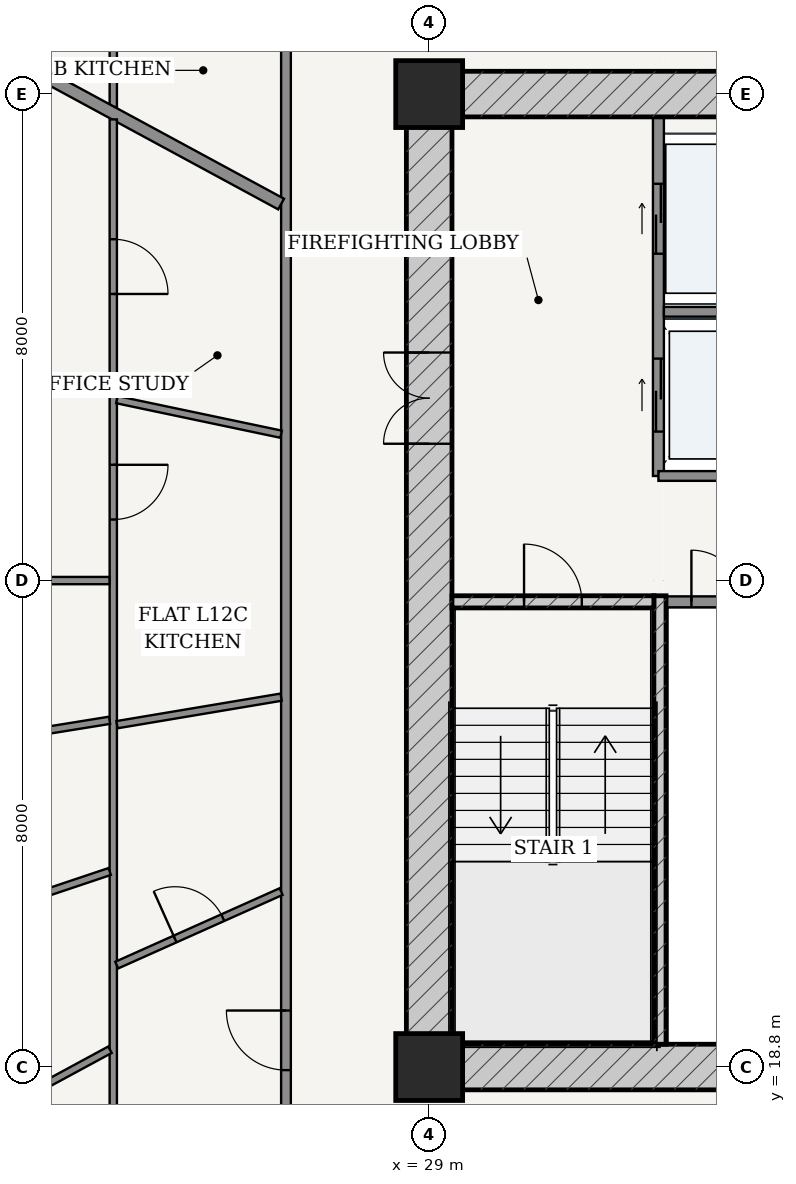
"""IFC4 building model, lengths in metres.
Left out: names, types, materials, properties, quantities, classifications, styles, units other than length and angle.
Written with IfcOpenShell. Run it as: python <this file> out.ifc"""

import sys

from ifc_helpers import new_model, si_unit, direction, frame, frame_2d, origin, origin_2d, place, context, subcontext, project, spatial, rectangle, extrude, source, transform, mapped, element, fill, save


model = new_model("IFC4")
c1 = context("Model", 3, precision=1e-05, world=origin(), true_north=direction((-0.2419218956, 0.970295726276)))
c2 = subcontext(c1, "Body", "Model", "MODEL_VIEW")
j1 = project(units=[si_unit("LENGTHUNIT", "METRE"), si_unit("PLANEANGLEUNIT", "RADIAN")], contexts=[c1])
p1 = place(None, origin())
s1 = spatial("IfcSite", under=j1, at=p1, CompositionType="ELEMENT")
p2 = place(p1, origin())
s2 = spatial("IfcBuilding", under=s1, at=p2, CompositionType="ELEMENT")
p3 = place(p2, frame((0.0, 0.0, 49.2)))
s3 = spatial("IfcBuildingStorey", under=s2, at=p3, CompositionType="ELEMENT", Elevation=49.2)
for number, where, z_axis, x_axis in (
    (1, (29.0, 18.8, 0.0), (0.0, 0.0, 1.0), (1.0, 0.0, 0.0)),
    (2, (29.0, 34.8, 0.0), (0.0, 0.0, 1.0), (1.0, 0.0, 0.0)),
):
    element("IfcColumn", number, at=place(p3, frame(where, z_axis=z_axis, x_axis=x_axis)), inside=s3, PredefinedType="COLUMN", context=c2, shape_type="SweptSolid", body=[
        extrude(rectangle(XDim=1.1, YDim=1.1, at=origin_2d()), origin(), (0.0, 0.0, 1.0), 3.6),
    ])
p4 = place(p3, frame((28.625, 18.8, 0.0), z_axis=(0.0, 0.0, 1.0), x_axis=(1.0, 0.0, 0.0)))
e3 = element("IfcWall", 3, at=p4, inside=s3, PredefinedType="SHEAR", context=c2, shape_type="SweptSolid", body=[
    extrude(rectangle(XDim=18.75, YDim=0.75, at=frame_2d((9.375, 0.0))), origin(), (0.0, 0.0, 1.0), 3.32),
])
p5 = place(p4, frame((7.627, 0.0, 0.0)))
e4 = element("IfcOpeningElement", 4, at=p5, cuts=e3, PredefinedType="OPENING", context=c2, shape_type="SweptSolid", body=[
    extrude(rectangle(XDim=0.85, YDim=2.1, at=frame_2d((0.425, 1.05))), frame((0.0, 0.385, 0.0), z_axis=(0.0, -1.0, 0.0), x_axis=(1.0, 0.0, 0.0)), (0.0, 0.0, 1.0), 0.77),
])
p6 = place(p4, frame((10.673, 0.0, 0.0)))
e5 = element("IfcOpeningElement", 5, at=p6, cuts=e3, PredefinedType="OPENING", context=c2, shape_type="SweptSolid", body=[
    extrude(rectangle(XDim=0.85, YDim=2.1, at=frame_2d((0.425, 1.05))), frame((0.0, 0.385, 0.0), z_axis=(0.0, -1.0, 0.0), x_axis=(1.0, 0.0, 0.0)), (0.0, 0.0, 1.0), 0.77),
])
p7 = place(p3, frame((28.625, 34.8, 0.0), z_axis=(0.0, 0.0, 1.0), x_axis=(1.0, 0.0, 0.0)))
e6 = element("IfcWall", 6, at=p7, inside=s3, PredefinedType="SHEAR", context=c2, shape_type="SweptSolid", body=[
    extrude(rectangle(XDim=18.75, YDim=0.75, at=frame_2d((9.375, 0.0))), origin(), (0.0, 0.0, 1.0), 3.32),
])
p8 = place(p7, frame((6.887, 0.0, 0.0)))
e7 = element("IfcOpeningElement", 7, at=p8, cuts=e6, PredefinedType="OPENING", context=c2, shape_type="SweptSolid", body=[
    extrude(rectangle(XDim=0.85, YDim=2.1, at=frame_2d((0.425, 1.05))), frame((0.0, 0.385, 0.0), z_axis=(0.0, -1.0, 0.0), x_axis=(1.0, 0.0, 0.0)), (0.0, 0.0, 1.0), 0.77),
])
p9 = place(p7, frame((8.945, 0.0, 0.0)))
e8 = element("IfcOpeningElement", 8, at=p9, cuts=e6, PredefinedType="OPENING", context=c2, shape_type="SweptSolid", body=[
    extrude(rectangle(XDim=0.86, YDim=2.1, at=frame_2d((0.43, 1.05))), frame((0.0, 0.385, 0.0), z_axis=(0.0, -1.0, 0.0), x_axis=(1.0, 0.0, 0.0)), (0.0, 0.0, 1.0), 0.77),
])
p10 = place(p7, frame((11.012, 0.0, 0.0)))
e9 = element("IfcOpeningElement", 9, at=p10, cuts=e6, PredefinedType="OPENING", context=c2, shape_type="SweptSolid", body=[
    extrude(rectangle(XDim=0.85, YDim=2.1, at=frame_2d((0.425, 1.05))), frame((0.0, 0.385, 0.0), z_axis=(0.0, -1.0, 0.0), x_axis=(1.0, 0.0, 0.0)), (0.0, 0.0, 1.0), 0.77),
])
p11 = place(p3, frame((29.0, 19.175, 0.0), z_axis=(0.0, 0.0, 1.0), x_axis=(0.0, 1.0, 0.0)))
e10 = element("IfcWall", 10, at=p11, inside=s3, PredefinedType="SHEAR", context=c2, shape_type="SweptSolid", body=[
    extrude(rectangle(XDim=15.25, YDim=0.75, at=frame_2d((7.625, 0.0))), origin(), (0.0, 0.0, 1.0), 3.32),
])
p12 = place(p11, frame((9.875, 0.0, 0.0)))
e11 = element("IfcOpeningElement", 11, at=p12, cuts=e10, PredefinedType="OPENING", context=c2, shape_type="SweptSolid", body=[
    extrude(rectangle(XDim=1.5, YDim=2.2, at=frame_2d((0.75, 1.1))), frame((0.0, 0.385, 0.0), z_axis=(0.0, -1.0, 0.0), x_axis=(1.0, 0.0, 0.0)), (0.0, 0.0, 1.0), 0.77),
])
p13 = place(p3, frame((32.795, 19.175, 0.0), z_axis=(0.0, 0.0, 1.0), x_axis=(0.0, 1.0, 0.0)))
e12 = element("IfcWall", 12, at=p13, inside=s3, PredefinedType="SOLIDWALL", context=c2, shape_type="SweptSolid", body=[
    extrude(rectangle(XDim=7.375, YDim=0.2, at=frame_2d((3.688, 0.0))), origin(), (0.0, 0.0, 1.0), 3.32),
])
p14 = place(p3, frame((29.375, 26.45, 0.0), z_axis=(0.0, 0.0, 1.0), x_axis=(1.0, 0.0, 0.0)))
e13 = element("IfcWall", 13, at=p14, inside=s3, PredefinedType="SOLIDWALL", context=c2, shape_type="SweptSolid", body=[
    extrude(rectangle(XDim=3.32, YDim=0.2, at=frame_2d((1.66, 0.0))), origin(), (0.0, 0.0, 1.0), 3.32),
])
p15 = place(p14, frame((1.185, 0.0, 0.0)))
e14 = element("IfcOpeningElement", 14, at=p15, cuts=e13, PredefinedType="OPENING", context=c2, shape_type="SweptSolid", body=[
    extrude(rectangle(XDim=0.95, YDim=2.15, at=frame_2d((0.475, 1.075))), frame((0.0, 0.11, 0.0), z_axis=(0.0, -1.0, 0.0), x_axis=(1.0, 0.0, 0.0)), (0.0, 0.0, 1.0), 0.22),
])
p16 = place(p3, frame((32.9, 26.45, 0.0), z_axis=(0.0, 0.0, 1.0), x_axis=(1.0, 0.0, 0.0)))
e15 = element("IfcWall", 15, at=p16, inside=s3, PredefinedType="PARTITIONING", context=c2, shape_type="SweptSolid", body=[
    extrude(rectangle(XDim=1.675, YDim=0.18, at=frame_2d((0.837, 0.0))), origin(), (0.0, 0.0, 1.0), 3.32),
])
p17 = place(p16, frame((0.413, 0.0, 0.0)))
e16 = element("IfcOpeningElement", 16, at=p17, cuts=e15, PredefinedType="OPENING", context=c2, shape_type="SweptSolid", body=[
    extrude(rectangle(XDim=0.85, YDim=2.1, at=frame_2d((0.425, 1.05))), frame((0.0, 0.1, 0.0), z_axis=(0.0, -1.0, 0.0), x_axis=(1.0, 0.0, 0.0)), (0.0, 0.0, 1.0), 0.2),
])
p18 = place(p3, frame((32.77, 28.52, 0.0), z_axis=(0.0, 0.0, 1.0), x_axis=(0.0, 1.0, 0.0)))
e17 = element("IfcWall", 17, at=p18, inside=s3, PredefinedType="PARTITIONING", context=c2, shape_type="SweptSolid", body=[
    extrude(rectangle(XDim=5.905, YDim=0.18, at=frame_2d((2.953, 0.0))), origin(), (0.0, 0.0, 1.0), 3.32),
])
p19 = place(p18, frame((3.655, 0.0, 0.0)))
e18 = element("IfcOpeningElement", 18, at=p19, cuts=e17, PredefinedType="OPENING", context=c2, shape_type="SweptSolid", body=[
    extrude(rectangle(XDim=1.15, YDim=2.2, at=frame_2d((0.575, 1.1))), frame((0.0, 0.1, 0.0), z_axis=(0.0, -1.0, 0.0), x_axis=(1.0, 0.0, 0.0)), (0.0, 0.0, 1.0), 0.2),
])
p20 = place(p18, frame((0.73, 0.0, 0.0)))
e19 = element("IfcOpeningElement", 19, at=p20, cuts=e17, PredefinedType="OPENING", context=c2, shape_type="SweptSolid", body=[
    extrude(rectangle(XDim=1.2, YDim=2.25, at=frame_2d((0.6, 1.125))), frame((0.0, 0.1, 0.0), z_axis=(0.0, -1.0, 0.0), x_axis=(1.0, 0.0, 0.0)), (0.0, 0.0, 1.0), 0.2),
])
p21 = place(p3, frame((32.86, 31.22, 0.0), z_axis=(0.0, 0.0, 1.0), x_axis=(1.0, 0.0, 0.0)))
e20 = element("IfcWall", 20, at=p21, inside=s3, PredefinedType="PARTITIONING", context=c2, shape_type="SweptSolid", body=[
    extrude(rectangle(XDim=1.715, YDim=0.16, at=frame_2d((0.857, 0.0))), origin(), (0.0, 0.0, 1.0), 3.32),
])
p22 = place(p3, frame((32.77, 28.52, 0.0), z_axis=(0.0, 0.0, 1.0), x_axis=(1.0, 0.0, 0.0)))
e21 = element("IfcWall", 21, at=p22, inside=s3, PredefinedType="PARTITIONING", context=c2, shape_type="SweptSolid", body=[
    extrude(rectangle(XDim=1.805, YDim=0.16, at=frame_2d((0.902, 0.0))), origin(), (0.0, 0.0, 1.0), 3.32),
])
p23 = place(p3, frame((26.645, 16.525, 0.0), z_axis=(0.0, 0.0, 1.0), x_axis=(0.0, 1.0, 0.0)))
e22 = element("IfcWall", 22, at=p23, inside=s3, PredefinedType="PARTITIONING", context=c2, shape_type="SweptSolid", body=[
    extrude(rectangle(XDim=20.55, YDim=0.16, at=frame_2d((10.275, 0.0))), origin(), (0.0, 0.0, 1.0), 2.688),
])
p24 = place(p23, frame((2.224, 0.0, 0.0)))
e23 = element("IfcOpeningElement", 23, at=p24, cuts=e22, PredefinedType="OPENING", context=c2, shape_type="SweptSolid", body=[
    extrude(rectangle(XDim=0.98, YDim=2.2, at=frame_2d((0.49, 1.1))), frame((0.0, 0.09, 0.0), z_axis=(0.0, -1.0, 0.0), x_axis=(1.0, 0.0, 0.0)), (0.0, 0.0, 1.0), 0.18),
])
p25 = place(p3, frame((23.805, 34.588, 0.0), z_axis=(0.0, 0.0, 1.0), x_axis=(0.0, 1.0, 0.0)))
e24 = element("IfcWall", 24, at=p25, inside=s3, PredefinedType="PARTITIONING", context=c2, shape_type="SweptSolid", body=[
    extrude(rectangle(XDim=5.407, YDim=0.12, at=frame_2d((2.704, 0.0))), origin(), (0.0, 0.0, 1.0), 2.999),
])
p26 = place(p25, frame((2.253, 0.0, 0.0)))
e25 = element("IfcOpeningElement", 25, at=p26, cuts=e24, PredefinedType="OPENING", context=c2, shape_type="SweptSolid", body=[
    extrude(rectangle(XDim=0.9, YDim=2.15, at=frame_2d((0.45, 1.075))), frame((0.0, 0.07, 0.0), z_axis=(0.0, -1.0, 0.0), x_axis=(1.0, 0.0, 0.0)), (0.0, 0.0, 1.0), 0.14),
])
p27 = place(p3, frame((26.565, 32.991, 0.0), z_axis=(0.0, 0.0, 1.0), x_axis=(-0.879369737803, 0.476139542819, 0.0)))
e26 = element("IfcWall", 26, at=p27, inside=s3, PredefinedType="PARTITIONING", context=c2, shape_type="SweptSolid", body=[
    extrude(rectangle(XDim=14.295, YDim=0.2, at=frame_2d((7.147, 0.0))), origin(), (0.0, 0.0, 1.0), 2.688),
])
p28 = place(p3, frame((23.805, 13.605, 0.0), z_axis=(0.0, 0.0, 1.0), x_axis=(0.0, 1.0, 0.0)))
e27 = element("IfcWall", 27, at=p28, inside=s3, PredefinedType="PARTITIONING", context=c2, shape_type="SweptSolid", body=[
    extrude(rectangle(XDim=20.779, YDim=0.12, at=frame_2d((10.39, 0.0))), origin(), (0.0, 0.0, 1.0), 2.688),
])
p29 = place(p28, frame((2.425, 0.0, 0.0)))
e28 = element("IfcOpeningElement", 28, at=p29, cuts=e27, PredefinedType="OPENING", context=c2, shape_type="SweptSolid", body=[
    extrude(rectangle(XDim=0.9, YDim=2.15, at=frame_2d((0.45, 1.075))), frame((0.0, 0.07, 0.0), z_axis=(0.0, -1.0, 0.0), x_axis=(1.0, 0.0, 0.0)), (0.0, 0.0, 1.0), 0.14),
])
p30 = place(p28, frame((14.199, 0.0, 0.0)))
e29 = element("IfcOpeningElement", 29, at=p30, cuts=e27, PredefinedType="OPENING", context=c2, shape_type="SweptSolid", body=[
    extrude(rectangle(XDim=0.9, YDim=2.15, at=frame_2d((0.45, 1.075))), frame((0.0, 0.07, 0.0), z_axis=(0.0, -1.0, 0.0), x_axis=(1.0, 0.0, 0.0)), (0.0, 0.0, 1.0), 0.14),
])
p31 = place(p28, frame((17.908, 0.0, 0.0)))
e30 = element("IfcOpeningElement", 30, at=p31, cuts=e27, PredefinedType="OPENING", context=c2, shape_type="SweptSolid", body=[
    extrude(rectangle(XDim=0.9, YDim=2.15, at=frame_2d((0.45, 1.075))), frame((0.0, 0.07, 0.0), z_axis=(0.0, -1.0, 0.0), x_axis=(1.0, 0.0, 0.0)), (0.0, 0.0, 1.0), 0.14),
])
p32 = place(p3, frame((23.743, 26.8, 0.0), z_axis=(0.0, 0.0, 1.0), x_axis=(-1.0, 0.0, 0.0)))
e31 = element("IfcWall", 31, at=p32, inside=s3, PredefinedType="PARTITIONING", context=c2, shape_type="SweptSolid", body=[
    extrude(rectangle(XDim=14.683, YDim=0.12, at=frame_2d((7.341, 0.0))), origin(), (0.0, 0.0, 1.0), 2.762),
])
p33 = place(p32, frame((6.892, 0.0, 0.0)))
e32 = element("IfcOpeningElement", 32, at=p33, cuts=e31, PredefinedType="OPENING", context=c2, shape_type="SweptSolid", body=[
    extrude(rectangle(XDim=0.9, YDim=2.15, at=frame_2d((0.45, 1.075))), frame((0.0, 0.07, 0.0), z_axis=(0.0, -1.0, 0.0), x_axis=(1.0, 0.0, 0.0)), (0.0, 0.0, 1.0), 0.14),
])
p34 = place(p3, frame((23.744, 24.502, 0.0), z_axis=(0.0, 0.0, 1.0), x_axis=(-0.987259708938, -0.159117149007, 0.0)))
e33 = element("IfcWall", 33, at=p34, inside=s3, PredefinedType="PARTITIONING", context=c2, shape_type="SweptSolid", body=[
    extrude(rectangle(XDim=14.248, YDim=0.12, at=frame_2d((7.124, 0.0))), origin(), (0.0, 0.0, 1.0), 2.688),
])
p35 = place(p34, frame((5.603, 0.0, 0.0)))
e34 = element("IfcOpeningElement", 34, at=p35, cuts=e33, PredefinedType="OPENING", context=c2, shape_type="SweptSolid", body=[
    extrude(rectangle(XDim=0.9, YDim=2.15, at=frame_2d((0.45, 1.075))), frame((0.0, 0.07, 0.0), z_axis=(0.0, -1.0, 0.0), x_axis=(1.0, 0.0, 0.0)), (0.0, 0.0, 1.0), 0.14),
])
p36 = place(p3, frame((23.746, 22.016, 0.0), z_axis=(0.0, 0.0, 1.0), x_axis=(-0.948022802246, -0.318202398516, 0.0)))
e35 = element("IfcWall", 35, at=p36, inside=s3, PredefinedType="PARTITIONING", context=c2, shape_type="SweptSolid", body=[
    extrude(rectangle(XDim=13.163, YDim=0.12, at=frame_2d((6.582, 0.0))), origin(), (0.0, 0.0, 1.0), 2.762),
])
p37 = place(p36, frame((6.131, 0.0, 0.0)))
e36 = element("IfcOpeningElement", 36, at=p37, cuts=e35, PredefinedType="OPENING", context=c2, shape_type="SweptSolid", body=[
    extrude(rectangle(XDim=0.9, YDim=2.15, at=frame_2d((0.45, 1.075))), frame((0.0, 0.07, 0.0), z_axis=(0.0, -1.0, 0.0), x_axis=(1.0, 0.0, 0.0)), (0.0, 0.0, 1.0), 0.14),
])
p38 = place(p3, frame((23.75, 19.084, 0.0), z_axis=(0.0, 0.0, 1.0), x_axis=(-0.879370672984, -0.476137815654, 0.0)))
e37 = element("IfcWall", 37, at=p38, inside=s3, PredefinedType="PARTITIONING", context=c2, shape_type="SweptSolid", body=[
    extrude(rectangle(XDim=11.094, YDim=0.12, at=frame_2d((5.547, 0.0))), origin(), (0.0, 0.0, 1.0), 2.688),
])
p39 = place(p38, frame((4.034, 0.0, 0.0)))
e38 = element("IfcOpeningElement", 38, at=p39, cuts=e37, PredefinedType="OPENING", context=c2, shape_type="SweptSolid", body=[
    extrude(rectangle(XDim=0.9, YDim=2.15, at=frame_2d((0.45, 1.075))), frame((0.0, 0.07, 0.0), z_axis=(0.0, -1.0, 0.0), x_axis=(1.0, 0.0, 0.0)), (0.0, 0.0, 1.0), 0.14),
])
p40 = place(p3, frame((26.565, 29.207, 0.0), z_axis=(0.0, 0.0, 1.0), x_axis=(-0.978560113768, 0.205961413236, 0.0)))
e39 = element("IfcWall", 39, at=p40, inside=s3, PredefinedType="PARTITIONING", context=c2, shape_type="SweptSolid", body=[
    extrude(rectangle(XDim=2.758, YDim=0.12, at=frame_2d((1.379, 0.0))), origin(), (0.0, 0.0, 1.0), 3.32),
])
p41 = place(p3, frame((26.565, 24.883, 0.0), z_axis=(0.0, 0.0, 1.0), x_axis=(-0.986224611599, -0.165411654596, 0.0)))
e40 = element("IfcWall", 40, at=p41, inside=s3, PredefinedType="PARTITIONING", context=c2, shape_type="SweptSolid", body=[
    extrude(rectangle(XDim=2.736, YDim=0.12, at=frame_2d((1.368, 0.0))), origin(), (0.0, 0.0, 1.0), 2.688),
])
p42 = place(p3, frame((26.565, 21.685, 0.0), z_axis=(0.0, 0.0, 1.0), x_axis=(-0.912840085104, -0.408317252914, 0.0)))
e41 = element("IfcWall", 41, at=p42, inside=s3, PredefinedType="PARTITIONING", context=c2, shape_type="SweptSolid", body=[
    extrude(rectangle(XDim=2.961, YDim=0.12, at=frame_2d((1.481, 0.0))), origin(), (0.0, 0.0, 1.0), 3.32),
])
p43 = place(p42, frame((1.051, 0.0, 0.0)))
e42 = element("IfcOpeningElement", 42, at=p43, cuts=e41, PredefinedType="OPENING", context=c2, shape_type="SweptSolid", body=[
    extrude(rectangle(XDim=0.86, YDim=2.15, at=frame_2d((0.43, 1.075))), frame((0.0, 0.07, 0.0), z_axis=(0.0, -1.0, 0.0), x_axis=(1.0, 0.0, 0.0)), (0.0, 0.0, 1.0), 0.14),
])
m1 = source(origin(), c2, "Body", "SweptSolid", [
    extrude(rectangle(XDim=1.5, YDim=2.2, at=frame_2d((0.75, 1.1))), frame((0.0, 0.025, 0.0), z_axis=(0.0, -1.0, 0.0), x_axis=(1.0, 0.0, 0.0)), (0.0, 0.0, 1.0), 0.05),
])
p44 = place(p12, origin())
e43 = element("IfcDoor", 43, at=p44, inside=s3, OperationType="DOUBLE_DOOR_SINGLE_SWING", PredefinedType="DOOR", context=c2, shape_type="MappedRepresentation", body=[
    mapped(m1, transform((0.0, 0.0, 0.0), scale=1.0)),
])
fill(e11, e43)
m2 = source(origin(), c2, "Body", "SweptSolid", [
    extrude(rectangle(XDim=0.95, YDim=2.15, at=frame_2d((0.475, 1.075))), frame((0.0, 0.025, 0.0), z_axis=(0.0, -1.0, 0.0), x_axis=(1.0, 0.0, 0.0)), (0.0, 0.0, 1.0), 0.05),
])
p45 = place(p15, origin())
e44 = element("IfcDoor", 44, at=p45, inside=s3, OperationType="SINGLE_SWING_LEFT", PredefinedType="DOOR", context=c2, shape_type="MappedRepresentation", body=[
    mapped(m2, transform((0.0, 0.0, 0.0), scale=1.0)),
])
fill(e14, e44)
m3 = source(origin(), c2, "Body", "SweptSolid", [
    extrude(rectangle(XDim=0.85, YDim=2.1, at=frame_2d((0.425, 1.05))), frame((0.0, 0.025, 0.0), z_axis=(0.0, -1.0, 0.0), x_axis=(1.0, 0.0, 0.0)), (0.0, 0.0, 1.0), 0.05),
])
p46 = place(p17, origin())
e45 = element("IfcDoor", 45, at=p46, inside=s3, OperationType="SINGLE_SWING_LEFT", PredefinedType="DOOR", context=c2, shape_type="MappedRepresentation", body=[
    mapped(m3, transform((0.0, 0.0, 0.0), scale=1.0)),
])
fill(e16, e45)
m4 = source(origin(), c2, "Body", "SweptSolid", [
    extrude(rectangle(XDim=1.15, YDim=2.2, at=frame_2d((0.575, 1.1))), frame((0.0, 0.025, 0.0), z_axis=(0.0, -1.0, 0.0), x_axis=(1.0, 0.0, 0.0)), (0.0, 0.0, 1.0), 0.05),
])
p47 = place(p19, origin())
e46 = element("IfcDoor", 46, at=p47, inside=s3, OperationType="DOUBLE_DOOR_SLIDING", PredefinedType="DOOR", context=c2, shape_type="MappedRepresentation", body=[
    mapped(m4, transform((0.0, 0.0, 0.0), scale=1.0)),
])
fill(e18, e46)
m5 = source(origin(), c2, "Body", "SweptSolid", [
    extrude(rectangle(XDim=1.2, YDim=2.25, at=frame_2d((0.6, 1.125))), frame((0.0, 0.025, 0.0), z_axis=(0.0, -1.0, 0.0), x_axis=(1.0, 0.0, 0.0)), (0.0, 0.0, 1.0), 0.05),
])
p48 = place(p20, origin())
e47 = element("IfcDoor", 47, at=p48, inside=s3, OperationType="DOUBLE_DOOR_SLIDING", PredefinedType="DOOR", context=c2, shape_type="MappedRepresentation", body=[
    mapped(m5, transform((0.0, 0.0, 0.0), scale=1.0)),
])
fill(e19, e47)
m6 = source(origin(), c2, "Body", "SweptSolid", [
    extrude(rectangle(XDim=0.98, YDim=2.2, at=frame_2d((0.49, 1.1))), frame((0.0, 0.025, 0.0), z_axis=(0.0, -1.0, 0.0), x_axis=(1.0, 0.0, 0.0)), (0.0, 0.0, 1.0), 0.05),
])
p49 = place(p24, origin())
e48 = element("IfcDoor", 48, at=p49, inside=s3, OperationType="SINGLE_SWING_RIGHT", PredefinedType="DOOR", context=c2, shape_type="MappedRepresentation", body=[
    mapped(m6, transform((0.0, 0.0, 0.0), scale=1.0)),
])
fill(e23, e48)
m7 = source(origin(), c2, "Body", "SweptSolid", [
    extrude(rectangle(XDim=0.86, YDim=2.15, at=frame_2d((0.43, 1.075))), frame((0.0, 0.025, 0.0), z_axis=(0.0, -1.0, 0.0), x_axis=(1.0, 0.0, 0.0)), (0.0, 0.0, 1.0), 0.05),
])
p50 = place(p43, frame((0.86, 0.0, 0.0), z_axis=(0.0, 0.0, 1.0), x_axis=(-1.0, 0.0, 0.0)))
e49 = element("IfcDoor", 49, at=p50, inside=s3, OperationType="SINGLE_SWING_LEFT", PredefinedType="DOOR", context=c2, shape_type="MappedRepresentation", body=[
    mapped(m7, transform((0.0, 0.0, 0.0), scale=1.0)),
])
fill(e42, e49)
m8 = source(origin(), c2, "Body", "SweptSolid", [
    extrude(rectangle(XDim=0.9, YDim=2.15, at=frame_2d((0.45, 1.075))), frame((0.0, 0.025, 0.0), z_axis=(0.0, -1.0, 0.0), x_axis=(1.0, 0.0, 0.0)), (0.0, 0.0, 1.0), 0.05),
])
p51 = place(p30, frame((0.9, 0.0, 0.0), z_axis=(0.0, 0.0, 1.0), x_axis=(-1.0, 0.0, 0.0)))
e50 = element("IfcDoor", 50, at=p51, inside=s3, OperationType="SINGLE_SWING_LEFT", PredefinedType="DOOR", context=c2, shape_type="MappedRepresentation", body=[
    mapped(m8, transform((0.0, 0.0, 0.0), scale=1.0)),
])
fill(e29, e50)
p52 = place(p31, frame((0.9, 0.0, 0.0), z_axis=(0.0, 0.0, 1.0), x_axis=(-1.0, 0.0, 0.0)))
e51 = element("IfcDoor", 51, at=p52, inside=s3, OperationType="SINGLE_SWING_RIGHT", PredefinedType="DOOR", context=c2, shape_type="MappedRepresentation", body=[
    mapped(m8, transform((0.0, 0.0, 0.0), scale=1.0)),
])
fill(e30, e51)
save(model, sys.argv[1])
